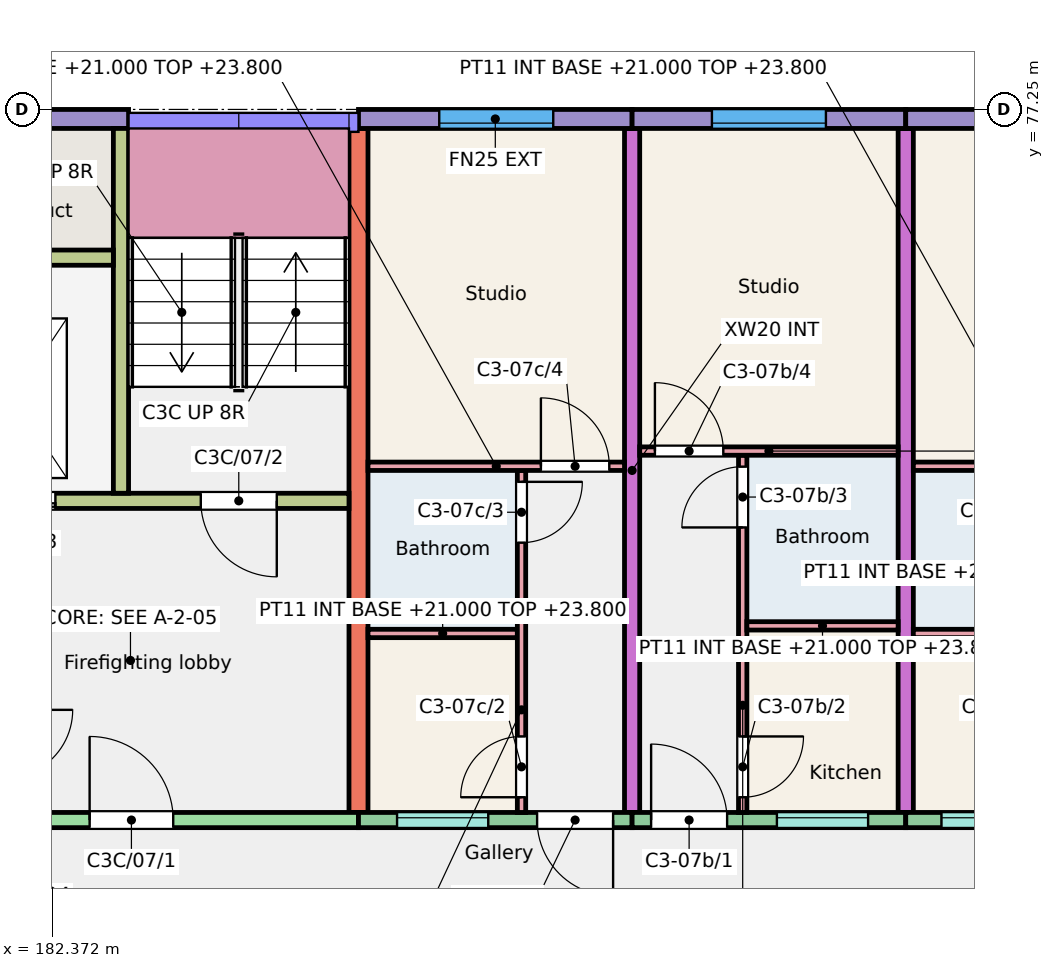
"""IFC4 building model, lengths in metres.
Left out: names, types, materials, properties, quantities, classifications, styles, units other than length and angle.
Written with IfcOpenShell. Run it as: python <this file> out.ifc"""

import sys

from ifc_helpers import new_model, si_unit, direction, frame, frame_2d, origin, place, context, subcontext, project, spatial, rectangle, extrude, element, fill, save


model = new_model("IFC4")
c1 = context("Model", 3, precision=1e-05, world=origin(), true_north=direction((0.0, 1.0)))
c2 = subcontext(c1, "Body", "Model", "MODEL_VIEW")
j1 = project(units=[si_unit("LENGTHUNIT", "METRE"), si_unit("PLANEANGLEUNIT", "RADIAN")], contexts=[c1])
p1 = place(None, origin())
s1 = spatial("IfcSite", under=j1, at=p1, CompositionType="ELEMENT")
p2 = place(p1, origin())
s2 = spatial("IfcBuilding", under=s1, at=p2, CompositionType="ELEMENT")
p3 = place(p2, frame((0.0, 0.0, 21.0)))
s3 = spatial("IfcBuildingStorey", under=s2, at=p3, CompositionType="ELEMENT", Elevation=21.0)
p4 = place(p3, frame((186.4, 68.0, 0.0), z_axis=(0.0, 0.0, 1.0), x_axis=(0.0, 1.0, 0.0)))
e1 = element("IfcWall", 1, at=p4, inside=s3, PredefinedType="SHEAR", context=c2, shape_type="SweptSolid", body=[
    extrude(rectangle(XDim=9.0, YDim=0.25, at=frame_2d((4.5, 0.0))), origin(), (0.0, 0.0, 1.0), 3.0),
])
for number, where, z_axis, x_axis in (
    (2, (190.0, 68.0, 0.0), (0.0, 0.0, 1.0), (0.0, 1.0, 0.0)),
    (3, (193.6, 68.0, 0.0), (0.0, 0.0, 1.0), (0.0, 1.0, 0.0)),
):
    element("IfcWall", number, at=place(p3, frame(where, z_axis=z_axis, x_axis=x_axis)), inside=s3, PredefinedType="SHEAR", context=c2, shape_type="SweptSolid", body=[
        extrude(rectangle(XDim=9.0, YDim=0.2, at=frame_2d((4.5, 0.0))), origin(), (0.0, 0.0, 1.0), 3.0),
    ])
p5 = place(p3, frame((180.4, 77.125, 0.0), z_axis=(0.0, 0.0, 1.0), x_axis=(1.0, 0.0, 0.0)))
e4 = element("IfcWall", 4, at=p5, inside=s3, PredefinedType="SOLIDWALL", context=c2, shape_type="SweptSolid", body=[
    extrude(rectangle(XDim=2.975, YDim=0.25, at=frame_2d((1.488, 0.0))), origin(), (0.0, 0.0, 1.0), 3.0),
])
p6 = place(p3, frame((180.55, 67.9, 0.0), z_axis=(0.0, 0.0, 1.0), x_axis=(1.0, 0.0, 0.0)))
e5 = element("IfcWall", 5, at=p6, inside=s3, PredefinedType="SHEAR", context=c2, shape_type="SweptSolid", body=[
    extrude(rectangle(XDim=5.85, YDim=0.2, at=frame_2d((2.925, 0.0))), origin(), (0.0, 0.0, 1.0), 3.0),
])
p7 = place(p6, frame((2.312, 0.0, 0.0)))
e6 = element("IfcOpeningElement", 6, at=p7, cuts=e5, PredefinedType="OPENING", context=c2, shape_type="SweptSolid", body=[
    extrude(rectangle(XDim=1.1, YDim=2.1, at=frame_2d((0.55, 1.05))), frame((0.0, 0.11, 0.0), z_axis=(0.0, -1.0, 0.0), x_axis=(1.0, 0.0, 0.0)), (0.0, 0.0, 1.0), 0.22),
])
p8 = place(p3, frame((180.55, 72.1, 0.0), z_axis=(0.0, 0.0, 1.0), x_axis=(1.0, 0.0, 0.0)))
e7 = element("IfcWall", 7, at=p8, inside=s3, PredefinedType="SHEAR", context=c2, shape_type="SweptSolid", body=[
    extrude(rectangle(XDim=5.725, YDim=0.2, at=frame_2d((2.862, 0.0))), origin(), (0.0, 0.0, 1.0), 3.0),
])
p9 = place(p8, frame((3.775, 0.0, 0.0)))
e8 = element("IfcOpeningElement", 8, at=p9, cuts=e7, PredefinedType="OPENING", context=c2, shape_type="SweptSolid", body=[
    extrude(rectangle(XDim=1.0, YDim=2.1, at=frame_2d((0.5, 1.05))), frame((0.0, 0.11, 0.0), z_axis=(0.0, -1.0, 0.0), x_axis=(1.0, 0.0, 0.0)), (0.0, 0.0, 1.0), 0.22),
])
p10 = place(p8, frame((0.762, 0.0, 0.0)))
e9 = element("IfcOpeningElement", 9, at=p10, cuts=e7, PredefinedType="OPENING", context=c2, shape_type="SweptSolid", body=[
    extrude(rectangle(XDim=1.1, YDim=2.1, at=frame_2d((0.55, 1.05))), frame((0.0, 0.11, 0.0), z_axis=(0.0, -1.0, 0.0), x_axis=(1.0, 0.0, 0.0)), (0.0, 0.0, 1.0), 0.22),
])
p11 = place(p3, frame((183.275, 72.2, 0.0), z_axis=(0.0, 0.0, 1.0), x_axis=(0.0, 1.0, 0.0)))
e10 = element("IfcWall", 10, at=p11, inside=s3, PredefinedType="SHEAR", context=c2, shape_type="SweptSolid", body=[
    extrude(rectangle(XDim=4.8, YDim=0.2, at=frame_2d((2.4, 0.0))), origin(), (0.0, 0.0, 1.0), 3.0),
])
p12 = place(p3, frame((180.55, 75.3, 0.0), z_axis=(0.0, 0.0, 1.0), x_axis=(1.0, 0.0, 0.0)))
e11 = element("IfcWall", 11, at=p12, inside=s3, PredefinedType="SHEAR", context=c2, shape_type="SweptSolid", body=[
    extrude(rectangle(XDim=2.625, YDim=0.2, at=frame_2d((1.312, 0.0))), origin(), (0.0, 0.0, 1.0), 3.0),
])
p13 = place(p3, frame((186.4, 77.125, 0.0), z_axis=(0.0, 0.0, 1.0), x_axis=(1.0, 0.0, 0.0)))
e12 = element("IfcWall", 12, at=p13, inside=s3, PredefinedType="SOLIDWALL", context=c2, shape_type="SweptSolid", body=[
    extrude(rectangle(XDim=3.6, YDim=0.25, at=frame_2d((1.8, 0.0))), origin(), (0.0, 0.0, 1.0), 3.0),
])
p14 = place(p13, frame((1.062, 0.0, 0.9)))
e13 = element("IfcOpeningElement", 13, at=p14, cuts=e12, PredefinedType="OPENING", context=c2, shape_type="SweptSolid", body=[
    extrude(rectangle(XDim=1.5, YDim=1.5, at=frame_2d((0.75, 0.75))), frame((0.0, 0.135, 0.0), z_axis=(0.0, -1.0, 0.0), x_axis=(1.0, 0.0, 0.0)), (0.0, 0.0, 1.0), 0.27),
])
p15 = place(p3, frame((186.4, 67.9, 0.0), z_axis=(0.0, 0.0, 1.0), x_axis=(1.0, 0.0, 0.0)))
e14 = element("IfcWall", 14, at=p15, inside=s3, PredefinedType="SOLIDWALL", context=c2, shape_type="SweptSolid", body=[
    extrude(rectangle(XDim=3.6, YDim=0.2, at=frame_2d((1.8, 0.0))), origin(), (0.0, 0.0, 1.0), 3.0),
])
p16 = place(p15, frame((0.508, 0.0, 1.1)))
e15 = element("IfcOpeningElement", 15, at=p16, cuts=e14, PredefinedType="OPENING", context=c2, shape_type="SweptSolid", body=[
    extrude(rectangle(XDim=1.2, YDim=1.3, at=frame_2d((0.6, 0.65))), frame((0.0, 0.11, 0.0), z_axis=(0.0, -1.0, 0.0), x_axis=(1.0, 0.0, 0.0)), (0.0, 0.0, 1.0), 0.22),
])
p17 = place(p15, frame((2.35, 0.0, 0.0)))
e16 = element("IfcOpeningElement", 16, at=p17, cuts=e14, PredefinedType="OPENING", context=c2, shape_type="SweptSolid", body=[
    extrude(rectangle(XDim=1.0, YDim=2.1, at=frame_2d((0.5, 1.05))), frame((0.0, 0.11, 0.0), z_axis=(0.0, -1.0, 0.0), x_axis=(1.0, 0.0, 0.0)), (0.0, 0.0, 1.0), 0.22),
])
p18 = place(p3, frame((190.0, 77.125, 0.0), z_axis=(0.0, 0.0, 1.0), x_axis=(1.0, 0.0, 0.0)))
e17 = element("IfcWall", 17, at=p18, inside=s3, PredefinedType="SOLIDWALL", context=c2, shape_type="SweptSolid", body=[
    extrude(rectangle(XDim=3.6, YDim=0.25, at=frame_2d((1.8, 0.0))), origin(), (0.0, 0.0, 1.0), 3.0),
])
p19 = place(p18, frame((1.05, 0.0, 0.9)))
e18 = element("IfcOpeningElement", 18, at=p19, cuts=e17, PredefinedType="OPENING", context=c2, shape_type="SweptSolid", body=[
    extrude(rectangle(XDim=1.5, YDim=1.5, at=frame_2d((0.75, 0.75))), frame((0.0, 0.135, 0.0), z_axis=(0.0, -1.0, 0.0), x_axis=(1.0, 0.0, 0.0)), (0.0, 0.0, 1.0), 0.27),
])
p20 = place(p3, frame((190.0, 67.9, 0.0), z_axis=(0.0, 0.0, 1.0), x_axis=(1.0, 0.0, 0.0)))
e19 = element("IfcWall", 19, at=p20, inside=s3, PredefinedType="SOLIDWALL", context=c2, shape_type="SweptSolid", body=[
    extrude(rectangle(XDim=3.6, YDim=0.2, at=frame_2d((1.8, 0.0))), origin(), (0.0, 0.0, 1.0), 3.0),
])
p21 = place(p20, frame((1.905, 0.0, 1.1)))
e20 = element("IfcOpeningElement", 20, at=p21, cuts=e19, PredefinedType="OPENING", context=c2, shape_type="SweptSolid", body=[
    extrude(rectangle(XDim=1.2, YDim=1.3, at=frame_2d((0.6, 0.65))), frame((0.0, 0.11, 0.0), z_axis=(0.0, -1.0, 0.0), x_axis=(1.0, 0.0, 0.0)), (0.0, 0.0, 1.0), 0.22),
])
p22 = place(p20, frame((0.25, 0.0, 0.0)))
e21 = element("IfcOpeningElement", 21, at=p22, cuts=e19, PredefinedType="OPENING", context=c2, shape_type="SweptSolid", body=[
    extrude(rectangle(XDim=1.0, YDim=2.1, at=frame_2d((0.5, 1.05))), frame((0.0, 0.11, 0.0), z_axis=(0.0, -1.0, 0.0), x_axis=(1.0, 0.0, 0.0)), (0.0, 0.0, 1.0), 0.22),
])
p23 = place(p3, frame((193.6, 77.125, 0.0), z_axis=(0.0, 0.0, 1.0), x_axis=(1.0, 0.0, 0.0)))
e22 = element("IfcWall", 22, at=p23, inside=s3, PredefinedType="SOLIDWALL", context=c2, shape_type="SweptSolid", body=[
    extrude(rectangle(XDim=3.6, YDim=0.25, at=frame_2d((1.8, 0.0))), origin(), (0.0, 0.0, 1.0), 3.0),
])
p24 = place(p23, frame((1.025, 0.0, 0.9)))
e23 = element("IfcOpeningElement", 23, at=p24, cuts=e22, PredefinedType="OPENING", context=c2, shape_type="SweptSolid", body=[
    extrude(rectangle(XDim=1.5, YDim=1.5, at=frame_2d((0.75, 0.75))), frame((0.0, 0.135, 0.0), z_axis=(0.0, -1.0, 0.0), x_axis=(1.0, 0.0, 0.0)), (0.0, 0.0, 1.0), 0.27),
])
p25 = place(p3, frame((193.6, 67.9, 0.0), z_axis=(0.0, 0.0, 1.0), x_axis=(1.0, 0.0, 0.0)))
e24 = element("IfcWall", 24, at=p25, inside=s3, PredefinedType="SOLIDWALL", context=c2, shape_type="SweptSolid", body=[
    extrude(rectangle(XDim=3.45, YDim=0.2, at=frame_2d((1.725, 0.0))), origin(), (0.0, 0.0, 1.0), 3.0),
])
p26 = place(p25, frame((0.47, 0.0, 1.1)))
e25 = element("IfcOpeningElement", 25, at=p26, cuts=e24, PredefinedType="OPENING", context=c2, shape_type="SweptSolid", body=[
    extrude(rectangle(XDim=1.2, YDim=1.3, at=frame_2d((0.6, 0.65))), frame((0.0, 0.11, 0.0), z_axis=(0.0, -1.0, 0.0), x_axis=(1.0, 0.0, 0.0)), (0.0, 0.0, 1.0), 0.22),
])
p27 = place(p25, frame((2.3, 0.0, 0.0)))
e26 = element("IfcOpeningElement", 26, at=p27, cuts=e24, PredefinedType="OPENING", context=c2, shape_type="SweptSolid", body=[
    extrude(rectangle(XDim=1.0, YDim=2.1, at=frame_2d((0.5, 1.05))), frame((0.0, 0.11, 0.0), z_axis=(0.0, -1.0, 0.0), x_axis=(1.0, 0.0, 0.0)), (0.0, 0.0, 1.0), 0.22),
])
p28 = place(p3, frame((193.7, 70.355, 0.0), z_axis=(0.0, 0.0, 1.0), x_axis=(1.0, 0.0, 0.0)))
e27 = element("IfcWall", 27, at=p28, inside=s3, PredefinedType="PARTITIONING", context=c2, shape_type="SweptSolid", body=[
    extrude(rectangle(XDim=1.94, YDim=0.11, at=frame_2d((0.97, 0.0))), origin(), (0.0, 0.0, 1.0), 2.8),
])
p29 = place(p3, frame((193.7, 72.555, 0.0), z_axis=(0.0, 0.0, 1.0), x_axis=(1.0, 0.0, 0.0)))
e28 = element("IfcWall", 28, at=p29, inside=s3, PredefinedType="PARTITIONING", context=c2, shape_type="SweptSolid", body=[
    extrude(rectangle(XDim=3.35, YDim=0.11, at=frame_2d((1.675, 0.0))), origin(), (0.0, 0.0, 1.0), 2.8),
])
p30 = place(p29, frame((2.25, 0.0, 0.0)))
e29 = element("IfcOpeningElement", 29, at=p30, cuts=e28, PredefinedType="OPENING", context=c2, shape_type="SweptSolid", body=[
    extrude(rectangle(XDim=0.9, YDim=2.1, at=frame_2d((0.45, 1.05))), frame((0.0, 0.065, 0.0), z_axis=(0.0, -1.0, 0.0), x_axis=(1.0, 0.0, 0.0)), (0.0, 0.0, 1.0), 0.13),
])
p31 = place(p3, frame((191.455, 68.0, 0.0), z_axis=(0.0, 0.0, 1.0), x_axis=(0.0, 1.0, 0.0)))
e30 = element("IfcWall", 30, at=p31, inside=s3, PredefinedType="PARTITIONING", context=c2, shape_type="SweptSolid", body=[
    extrude(rectangle(XDim=4.7, YDim=0.11, at=frame_2d((2.35, 0.0))), origin(), (0.0, 0.0, 1.0), 2.8),
])
p32 = place(p31, frame((0.2, 0.0, 0.0)))
e31 = element("IfcOpeningElement", 31, at=p32, cuts=e30, PredefinedType="OPENING", context=c2, shape_type="SweptSolid", body=[
    extrude(rectangle(XDim=0.8, YDim=2.1, at=frame_2d((0.4, 1.05))), frame((0.0, 0.065, 0.0), z_axis=(0.0, -1.0, 0.0), x_axis=(1.0, 0.0, 0.0)), (0.0, 0.0, 1.0), 0.13),
])
p33 = place(p31, frame((3.75, 0.0, 0.0)))
e32 = element("IfcOpeningElement", 32, at=p33, cuts=e30, PredefinedType="OPENING", context=c2, shape_type="SweptSolid", body=[
    extrude(rectangle(XDim=0.8, YDim=2.1, at=frame_2d((0.4, 1.05))), frame((0.0, 0.065, 0.0), z_axis=(0.0, -1.0, 0.0), x_axis=(1.0, 0.0, 0.0)), (0.0, 0.0, 1.0), 0.13),
])
p34 = place(p3, frame((191.51, 70.455, 0.0), z_axis=(0.0, 0.0, 1.0), x_axis=(1.0, 0.0, 0.0)))
e33 = element("IfcWall", 33, at=p34, inside=s3, PredefinedType="PARTITIONING", context=c2, shape_type="SweptSolid", body=[
    extrude(rectangle(XDim=1.99, YDim=0.11, at=frame_2d((0.995, 0.0))), origin(), (0.0, 0.0, 1.0), 2.8),
])
p35 = place(p3, frame((190.1, 72.755, 0.0), z_axis=(0.0, 0.0, 1.0), x_axis=(1.0, 0.0, 0.0)))
e34 = element("IfcWall", 34, at=p35, inside=s3, PredefinedType="PARTITIONING", context=c2, shape_type="SweptSolid", body=[
    extrude(rectangle(XDim=3.4, YDim=0.11, at=frame_2d((1.7, 0.0))), origin(), (0.0, 0.0, 1.0), 2.8),
])
p36 = place(p35, frame((0.2, 0.0, 0.0)))
e35 = element("IfcOpeningElement", 35, at=p36, cuts=e34, PredefinedType="OPENING", context=c2, shape_type="SweptSolid", body=[
    extrude(rectangle(XDim=0.9, YDim=2.1, at=frame_2d((0.45, 1.05))), frame((0.0, 0.065, 0.0), z_axis=(0.0, -1.0, 0.0), x_axis=(1.0, 0.0, 0.0)), (0.0, 0.0, 1.0), 0.13),
])
p37 = place(p3, frame((186.525, 70.355, 0.0), z_axis=(0.0, 0.0, 1.0), x_axis=(1.0, 0.0, 0.0)))
e36 = element("IfcWall", 36, at=p37, inside=s3, PredefinedType="PARTITIONING", context=c2, shape_type="SweptSolid", body=[
    extrude(rectangle(XDim=1.965, YDim=0.11, at=frame_2d((0.982, 0.0))), origin(), (0.0, 0.0, 1.0), 2.8),
])
p38 = place(p3, frame((188.545, 68.0, 0.0), z_axis=(0.0, 0.0, 1.0), x_axis=(0.0, 1.0, 0.0)))
e37 = element("IfcWall", 37, at=p38, inside=s3, PredefinedType="PARTITIONING", context=c2, shape_type="SweptSolid", body=[
    extrude(rectangle(XDim=4.5, YDim=0.11, at=frame_2d((2.25, 0.0))), origin(), (0.0, 0.0, 1.0), 2.8),
])
p39 = place(p38, frame((0.2, 0.0, 0.0)))
e38 = element("IfcOpeningElement", 38, at=p39, cuts=e37, PredefinedType="OPENING", context=c2, shape_type="SweptSolid", body=[
    extrude(rectangle(XDim=0.8, YDim=2.1, at=frame_2d((0.4, 1.05))), frame((0.0, 0.065, 0.0), z_axis=(0.0, -1.0, 0.0), x_axis=(1.0, 0.0, 0.0)), (0.0, 0.0, 1.0), 0.13),
])
p40 = place(p38, frame((3.55, 0.0, 0.0)))
e39 = element("IfcOpeningElement", 39, at=p40, cuts=e37, PredefinedType="OPENING", context=c2, shape_type="SweptSolid", body=[
    extrude(rectangle(XDim=0.8, YDim=2.1, at=frame_2d((0.4, 1.05))), frame((0.0, 0.065, 0.0), z_axis=(0.0, -1.0, 0.0), x_axis=(1.0, 0.0, 0.0)), (0.0, 0.0, 1.0), 0.13),
])
p41 = place(p3, frame((186.525, 72.555, 0.0), z_axis=(0.0, 0.0, 1.0), x_axis=(1.0, 0.0, 0.0)))
e40 = element("IfcWall", 40, at=p41, inside=s3, PredefinedType="PARTITIONING", context=c2, shape_type="SweptSolid", body=[
    extrude(rectangle(XDim=3.375, YDim=0.11, at=frame_2d((1.688, 0.0))), origin(), (0.0, 0.0, 1.0), 2.8),
])
p42 = place(p41, frame((2.275, 0.0, 0.0)))
e41 = element("IfcOpeningElement", 41, at=p42, cuts=e40, PredefinedType="OPENING", context=c2, shape_type="SweptSolid", body=[
    extrude(rectangle(XDim=0.9, YDim=2.1, at=frame_2d((0.45, 1.05))), frame((0.0, 0.065, 0.0), z_axis=(0.0, -1.0, 0.0), x_axis=(1.0, 0.0, 0.0)), (0.0, 0.0, 1.0), 0.13),
])
p43 = place(p26, origin())
e42 = element("IfcWindow", 42, at=p43, inside=s3, PartitioningType="SINGLE_PANEL", PredefinedType="WINDOW", context=c2, shape_type="SweptSolid", body=[
    extrude(rectangle(XDim=1.2, YDim=1.3, at=frame_2d((0.6, 0.65))), frame((0.0, 0.06, 0.0), z_axis=(0.0, -1.0, 0.0), x_axis=(1.0, 0.0, 0.0)), (0.0, 0.0, 1.0), 0.06),
])
fill(e25, e42)
p44 = place(p21, origin())
e43 = element("IfcWindow", 43, at=p44, inside=s3, PartitioningType="SINGLE_PANEL", PredefinedType="WINDOW", context=c2, shape_type="SweptSolid", body=[
    extrude(rectangle(XDim=1.2, YDim=1.3, at=frame_2d((0.6, 0.65))), frame((0.0, 0.06, 0.0), z_axis=(0.0, -1.0, 0.0), x_axis=(1.0, 0.0, 0.0)), (0.0, 0.0, 1.0), 0.06),
])
fill(e20, e43)
p45 = place(p19, origin())
e44 = element("IfcWindow", 44, at=p45, inside=s3, PartitioningType="SINGLE_PANEL", PredefinedType="WINDOW", context=c2, shape_type="SweptSolid", body=[
    extrude(rectangle(XDim=1.5, YDim=1.5, at=frame_2d((0.75, 0.75))), frame((0.0, -0.025, 0.0), z_axis=(0.0, -1.0, 0.0), x_axis=(1.0, 0.0, 0.0)), (0.0, 0.0, 1.0), 0.06),
])
fill(e18, e44)
p46 = place(p16, origin())
e45 = element("IfcWindow", 45, at=p46, inside=s3, PartitioningType="SINGLE_PANEL", PredefinedType="WINDOW", context=c2, shape_type="SweptSolid", body=[
    extrude(rectangle(XDim=1.2, YDim=1.3, at=frame_2d((0.6, 0.65))), frame((0.0, 0.06, 0.0), z_axis=(0.0, -1.0, 0.0), x_axis=(1.0, 0.0, 0.0)), (0.0, 0.0, 1.0), 0.06),
])
fill(e15, e45)
p47 = place(p14, origin())
e46 = element("IfcWindow", 46, at=p47, inside=s3, PartitioningType="SINGLE_PANEL", PredefinedType="WINDOW", context=c2, shape_type="SweptSolid", body=[
    extrude(rectangle(XDim=1.5, YDim=1.5, at=frame_2d((0.75, 0.75))), frame((0.0, -0.025, 0.0), z_axis=(0.0, -1.0, 0.0), x_axis=(1.0, 0.0, 0.0)), (0.0, 0.0, 1.0), 0.06),
])
fill(e13, e46)
p48 = place(p22, origin())
e47 = element("IfcDoor", 47, at=p48, inside=s3, OperationType="SINGLE_SWING_LEFT", PredefinedType="DOOR", context=c2, shape_type="SweptSolid", body=[
    extrude(rectangle(XDim=1.0, YDim=2.1, at=frame_2d((0.5, 1.05))), frame((0.0, 0.025, 0.0), z_axis=(0.0, -1.0, 0.0), x_axis=(1.0, 0.0, 0.0)), (0.0, 0.0, 1.0), 0.05),
])
fill(e21, e47)
p49 = place(p32, origin())
e48 = element("IfcDoor", 48, at=p49, inside=s3, OperationType="SINGLE_SWING_RIGHT", PredefinedType="DOOR", context=c2, shape_type="SweptSolid", body=[
    extrude(rectangle(XDim=0.8, YDim=2.1, at=frame_2d((0.4, 1.05))), frame((0.0, 0.025, 0.0), z_axis=(0.0, -1.0, 0.0), x_axis=(1.0, 0.0, 0.0)), (0.0, 0.0, 1.0), 0.05),
])
fill(e31, e48)
p50 = place(p33, origin())
e49 = element("IfcDoor", 49, at=p50, inside=s3, OperationType="SINGLE_SWING_LEFT", PredefinedType="DOOR", context=c2, shape_type="SweptSolid", body=[
    extrude(rectangle(XDim=0.8, YDim=2.1, at=frame_2d((0.4, 1.05))), frame((0.0, 0.025, 0.0), z_axis=(0.0, -1.0, 0.0), x_axis=(1.0, 0.0, 0.0)), (0.0, 0.0, 1.0), 0.05),
])
fill(e32, e49)
p51 = place(p36, origin())
e50 = element("IfcDoor", 50, at=p51, inside=s3, OperationType="SINGLE_SWING_LEFT", PredefinedType="DOOR", context=c2, shape_type="SweptSolid", body=[
    extrude(rectangle(XDim=0.9, YDim=2.1, at=frame_2d((0.45, 1.05))), frame((0.0, 0.025, 0.0), z_axis=(0.0, -1.0, 0.0), x_axis=(1.0, 0.0, 0.0)), (0.0, 0.0, 1.0), 0.05),
])
fill(e35, e50)
p52 = place(p17, origin())
e51 = element("IfcDoor", 51, at=p52, inside=s3, OperationType="SINGLE_SWING_RIGHT", PredefinedType="DOOR", context=c2, shape_type="SweptSolid", body=[
    extrude(rectangle(XDim=1.0, YDim=2.1, at=frame_2d((0.5, 1.05))), frame((0.0, 0.025, 0.0), z_axis=(0.0, -1.0, 0.0), x_axis=(1.0, 0.0, 0.0)), (0.0, 0.0, 1.0), 0.05),
])
fill(e16, e51)
p53 = place(p39, origin())
e52 = element("IfcDoor", 52, at=p53, inside=s3, OperationType="SINGLE_SWING_LEFT", PredefinedType="DOOR", context=c2, shape_type="SweptSolid", body=[
    extrude(rectangle(XDim=0.8, YDim=2.1, at=frame_2d((0.4, 1.05))), frame((0.0, 0.025, 0.0), z_axis=(0.0, -1.0, 0.0), x_axis=(1.0, 0.0, 0.0)), (0.0, 0.0, 1.0), 0.05),
])
fill(e38, e52)
p54 = place(p40, origin())
e53 = element("IfcDoor", 53, at=p54, inside=s3, OperationType="SINGLE_SWING_RIGHT", PredefinedType="DOOR", context=c2, shape_type="SweptSolid", body=[
    extrude(rectangle(XDim=0.8, YDim=2.1, at=frame_2d((0.4, 1.05))), frame((0.0, 0.025, 0.0), z_axis=(0.0, -1.0, 0.0), x_axis=(1.0, 0.0, 0.0)), (0.0, 0.0, 1.0), 0.05),
])
fill(e39, e53)
p55 = place(p42, origin())
e54 = element("IfcDoor", 54, at=p55, inside=s3, OperationType="SINGLE_SWING_LEFT", PredefinedType="DOOR", context=c2, shape_type="SweptSolid", body=[
    extrude(rectangle(XDim=0.9, YDim=2.1, at=frame_2d((0.45, 1.05))), frame((0.0, 0.025, 0.0), z_axis=(0.0, -1.0, 0.0), x_axis=(1.0, 0.0, 0.0)), (0.0, 0.0, 1.0), 0.05),
])
fill(e41, e54)
p56 = place(p7, origin())
e55 = element("IfcDoor", 55, at=p56, inside=s3, OperationType="SINGLE_SWING_LEFT", PredefinedType="DOOR", context=c2, shape_type="SweptSolid", body=[
    extrude(rectangle(XDim=1.1, YDim=2.1, at=frame_2d((0.55, 1.05))), frame((0.0, 0.025, 0.0), z_axis=(0.0, -1.0, 0.0), x_axis=(1.0, 0.0, 0.0)), (0.0, 0.0, 1.0), 0.05),
])
fill(e6, e55)
p57 = place(p9, origin())
e56 = element("IfcDoor", 56, at=p57, inside=s3, OperationType="SINGLE_SWING_RIGHT", PredefinedType="DOOR", context=c2, shape_type="SweptSolid", body=[
    extrude(rectangle(XDim=1.0, YDim=2.1, at=frame_2d((0.5, 1.05))), frame((0.0, 0.025, 0.0), z_axis=(0.0, -1.0, 0.0), x_axis=(1.0, 0.0, 0.0)), (0.0, 0.0, 1.0), 0.05),
])
fill(e8, e56)
p58 = place(p10, origin())
e57 = element("IfcDoor", 57, at=p58, inside=s3, OperationType="DOUBLE_DOOR_SLIDING", PredefinedType="DOOR", context=c2, shape_type="SweptSolid", body=[
    extrude(rectangle(XDim=1.1, YDim=2.1, at=frame_2d((0.55, 1.05))), frame((0.0, 0.025, 0.0), z_axis=(0.0, -1.0, 0.0), x_axis=(1.0, 0.0, 0.0)), (0.0, 0.0, 1.0), 0.05),
])
fill(e9, e57)
save(model, sys.argv[1])
